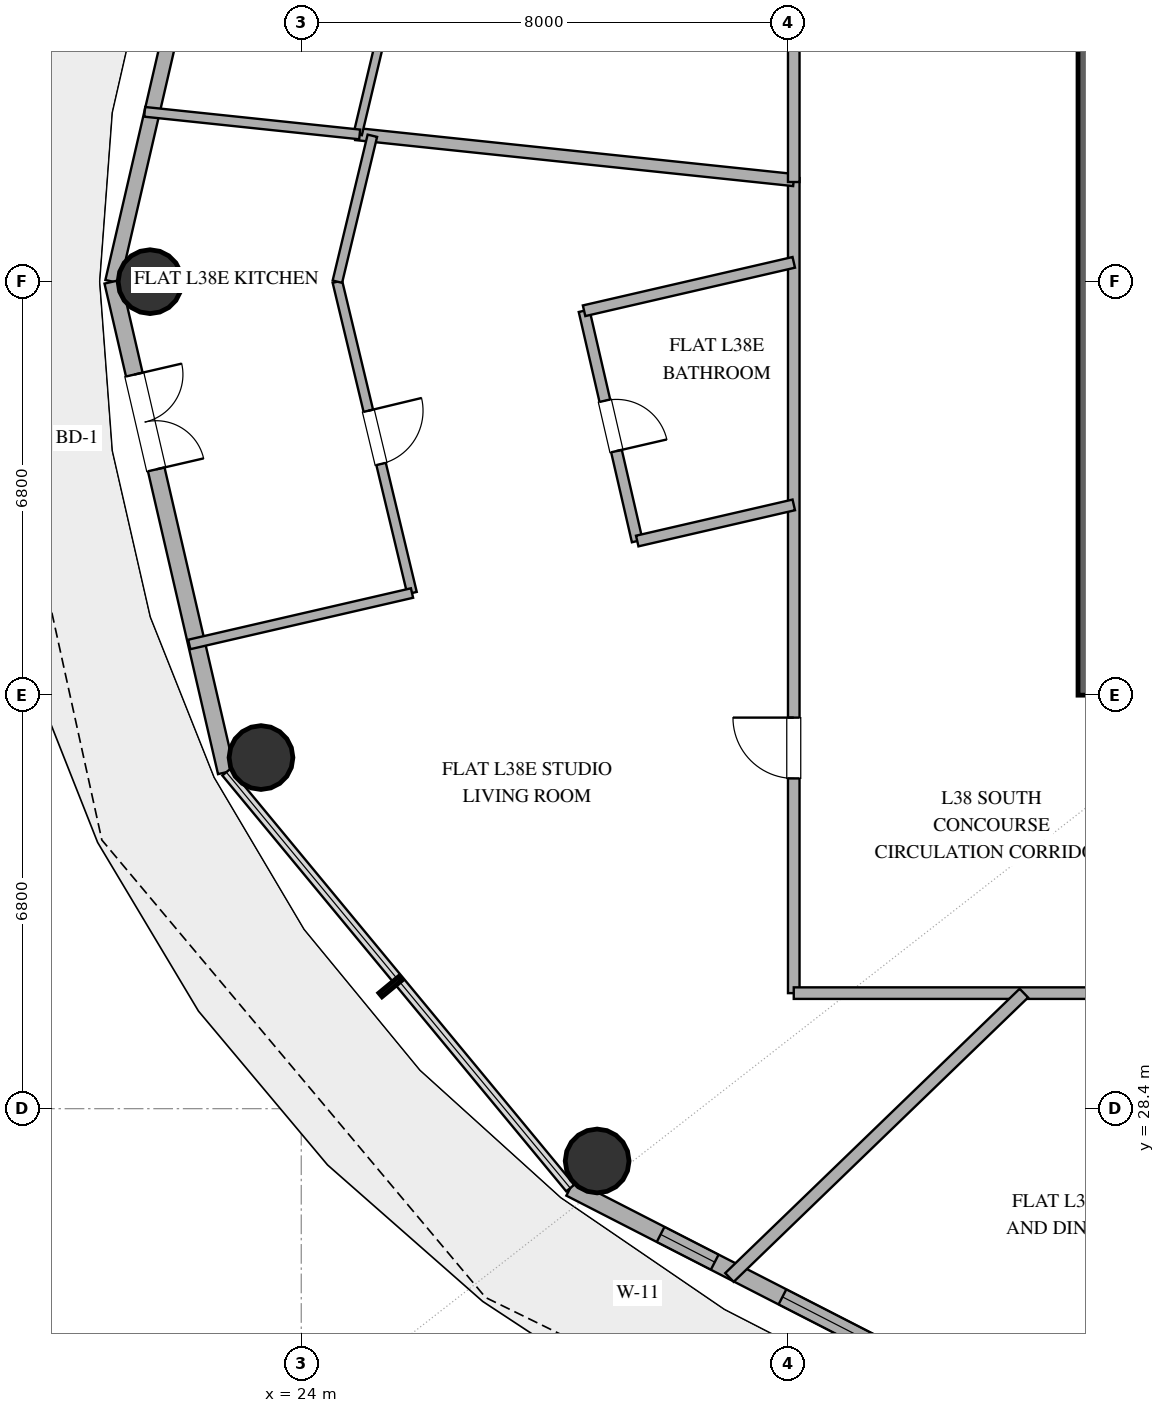
"""IFC4 building model, lengths in metres.
Left out: names, types, materials, properties, quantities, classifications, styles, units other than length and angle.
Written with IfcOpenShell. Run it as: python <this file> out.ifc"""

import sys

from ifc_helpers import new_model, si_unit, direction, frame, frame_2d, origin, origin_2d, place, context, subcontext, project, spatial, rectangle, hollow_circle, extrude, element, fill, save


model = new_model("IFC4")
c1 = context("Model", 3, precision=1e-05, world=origin(), true_north=direction((0.0, 1.0)))
c2 = subcontext(c1, "Body", "Model", "MODEL_VIEW")
j1 = project(units=[si_unit("LENGTHUNIT", "METRE"), si_unit("PLANEANGLEUNIT", "RADIAN")], contexts=[c1])
p1 = place(None, origin())
s1 = spatial("IfcSite", under=j1, at=p1, CompositionType="ELEMENT")
p2 = place(p1, origin())
s2 = spatial("IfcBuilding", under=s1, at=p2, CompositionType="ELEMENT")
p3 = place(p2, frame((0.0, 0.0, 154.2)))
s3 = spatial("IfcBuildingStorey", under=s2, at=p3, CompositionType="ELEMENT", Elevation=154.2)
p4 = place(p3, frame((37.0, 35.2, 0.0), z_axis=(0.0, 0.0, 1.0), x_axis=(0.0, 1.0, 0.0)))
e1 = element("IfcWall", 1, at=p4, inside=s3, PredefinedType="SHEAR", context=c2, shape_type="SweptSolid", body=[
    extrude(rectangle(XDim=13.6, YDim=0.45, at=frame_2d((6.8, 0.0))), origin(), (0.0, 0.0, 1.0), 3.38),
])
for number, where, z_axis, x_axis in (
    (2, (21.513, 42.0, 0.0), (0.0, 0.0, 1.0), (1.0, 0.0, 0.0)),
    (3, (23.338, 34.174, 0.0), (0.0, 0.0, 1.0), (1.0, 0.0, 0.0)),
    (4, (28.866, 27.54, 0.0), (0.0, 0.0, 1.0), (1.0, 0.0, 0.0)),
):
    element("IfcColumn", number, at=place(p3, frame(where, z_axis=z_axis, x_axis=x_axis)), inside=s3, PredefinedType="COLUMN", context=c2, shape_type="SweptSolid", body=[
        extrude(hollow_circle(Radius=0.525, WallThickness=0.028, at=origin_2d()), origin(), (0.0, 0.0, 1.0), 3.38),
    ])
p5 = place(p3, frame((22.768, 50.067, 0.0), z_axis=(0.0, 0.0, 1.0), x_axis=(-0.225473184558, -0.974249374157, 0.0)))
e5 = element("IfcWall", 5, at=p5, inside=s3, PredefinedType="SOLIDWALL", context=c2, shape_type="SweptSolid", body=[
    extrude(rectangle(XDim=8.28, YDim=0.25, at=frame_2d((4.14, 0.0))), origin(), (0.0, 0.0, 1.0), 3.38),
])
p6 = place(p5, frame((1.764, 0.0, 1.42)))
e6 = element("IfcOpeningElement", 6, at=p6, cuts=e5, PredefinedType="OPENING", context=c2, shape_type="SweptSolid", body=[
    extrude(rectangle(XDim=1.0, YDim=1.05, at=frame_2d((0.5, 0.525))), frame((0.0, 0.135, 0.0), z_axis=(0.0, -1.0, 0.0), x_axis=(1.0, 0.0, 0.0)), (0.0, 0.0, 1.0), 0.27),
])
p7 = place(p3, frame((20.901, 42.0, 0.0), z_axis=(0.0, 0.0, 1.0), x_axis=(0.225473184558, -0.974249374157, 0.0)))
e7 = element("IfcWall", 7, at=p7, inside=s3, PredefinedType="SOLIDWALL", context=c2, shape_type="SweptSolid", body=[
    extrude(rectangle(XDim=8.28, YDim=0.28, at=frame_2d((4.14, 0.0))), origin(), (0.0, 0.0, 1.0), 3.38),
])
p8 = place(p7, frame((1.568, 0.0, 0.0)))
e8 = element("IfcOpeningElement", 8, at=p8, cuts=e7, PredefinedType="OPENING", context=c2, shape_type="SweptSolid", body=[
    extrude(rectangle(XDim=1.6, YDim=2.25, at=frame_2d((0.8, 1.125))), frame((0.0, 0.15, 0.0), z_axis=(0.0, -1.0, 0.0), x_axis=(1.0, 0.0, 0.0)), (0.0, 0.0, 1.0), 0.3),
])
p9 = place(p3, frame((28.424, 27.094, 0.0), z_axis=(0.0, 0.0, 1.0), x_axis=(0.889872523182, -0.456209263919, 0.0)))
e9 = element("IfcWall", 9, at=p9, inside=s3, PredefinedType="SOLIDWALL", context=c2, shape_type="SweptSolid", body=[
    extrude(rectangle(XDim=10.016, YDim=0.28, at=frame_2d((5.008, 0.0))), origin(), (0.0, 0.0, 1.0), 3.38),
])
p10 = place(p9, frame((1.67, 0.0, 0.85)))
e10 = element("IfcOpeningElement", 10, at=p10, cuts=e9, PredefinedType="OPENING", context=c2, shape_type="SweptSolid", body=[
    extrude(rectangle(XDim=1.0, YDim=1.8, at=frame_2d((0.5, 0.9))), frame((0.0, 0.15, 0.0), z_axis=(0.0, -1.0, 0.0), x_axis=(1.0, 0.0, 0.0)), (0.0, 0.0, 1.0), 0.3),
])
p11 = place(p9, frame((3.922, 0.0, 0.85)))
e11 = element("IfcOpeningElement", 11, at=p11, cuts=e9, PredefinedType="OPENING", context=c2, shape_type="SweptSolid", body=[
    extrude(rectangle(XDim=1.65, YDim=2.0, at=frame_2d((0.825, 1.0))), frame((0.0, 0.15, 0.0), z_axis=(0.0, -1.0, 0.0), x_axis=(1.0, 0.0, 0.0)), (0.0, 0.0, 1.0), 0.3),
])
p12 = place(p9, frame((6.244, 0.0, 0.85)))
e12 = element("IfcOpeningElement", 12, at=p12, cuts=e9, PredefinedType="OPENING", context=c2, shape_type="SweptSolid", body=[
    extrude(rectangle(XDim=1.65, YDim=2.0, at=frame_2d((0.825, 1.0))), frame((0.0, 0.15, 0.0), z_axis=(0.0, -1.0, 0.0), x_axis=(1.0, 0.0, 0.0)), (0.0, 0.0, 1.0), 0.3),
])
p13 = place(p3, frame((32.1, 30.3, 0.0), z_axis=(0.0, 0.0, 1.0), x_axis=(0.0, 1.0, 0.0)))
e13 = element("IfcWall", 13, at=p13, inside=s3, PredefinedType="PARTITIONING", context=c2, shape_type="SweptSolid", body=[
    extrude(rectangle(XDim=13.403, YDim=0.19, at=frame_2d((6.702, 0.0))), origin(), (0.0, 0.0, 1.0), 2.74),
])
p14 = place(p13, frame((3.531, 0.0, 0.0)))
e14 = element("IfcOpeningElement", 14, at=p14, cuts=e13, PredefinedType="OPENING", context=c2, shape_type="SweptSolid", body=[
    extrude(rectangle(XDim=1.0, YDim=2.2, at=frame_2d((0.5, 1.1))), frame((0.0, 0.105, 0.0), z_axis=(0.0, -1.0, 0.0), x_axis=(1.0, 0.0, 0.0)), (0.0, 0.0, 1.0), 0.21),
])
p15 = place(p3, frame((32.1, 43.671, 0.0), z_axis=(0.0, 0.0, 1.0), x_axis=(-0.994522615629, 0.104521610217, 0.0)))
e15 = element("IfcWall", 15, at=p15, inside=s3, PredefinedType="PARTITIONING", context=c2, shape_type="SweptSolid", body=[
    extrude(rectangle(XDim=7.243, YDim=0.2, at=frame_2d((3.622, 0.0))), origin(), (0.0, 0.0, 1.0), 2.74),
])
p16 = place(p3, frame((32.1, 30.3, 0.0), z_axis=(0.0, 0.0, 1.0), x_axis=(1.0, 0.0, 0.0)))
e16 = element("IfcWall", 16, at=p16, inside=s3, PredefinedType="PARTITIONING", context=c2, shape_type="SweptSolid", body=[
    extrude(rectangle(XDim=15.491, YDim=0.19, at=frame_2d((7.746, 0.0))), origin(), (0.0, 0.0, 1.0), 2.74),
])
p17 = place(p16, frame((6.738, 0.0, 0.0)))
e17 = element("IfcOpeningElement", 17, at=p17, cuts=e16, PredefinedType="OPENING", context=c2, shape_type="SweptSolid", body=[
    extrude(rectangle(XDim=1.0, YDim=2.2, at=frame_2d((0.5, 1.1))), frame((0.0, 0.105, 0.0), z_axis=(0.0, -1.0, 0.0), x_axis=(1.0, 0.0, 0.0)), (0.0, 0.0, 1.0), 0.21),
])
p18 = place(p3, frame((31.042, 25.624, 0.0), z_axis=(0.0, 0.0, 1.0), x_axis=(0.719330837604, 0.694667651522, 0.0)))
e18 = element("IfcWall", 18, at=p18, inside=s3, PredefinedType="PARTITIONING", context=c2, shape_type="SweptSolid", body=[
    extrude(rectangle(XDim=6.731, YDim=0.2, at=frame_2d((3.366, 0.0))), origin(), (0.0, 0.0, 1.0), 2.74),
])
p19 = place(p3, frame((32.1, 43.639, 0.0), z_axis=(0.0, 0.0, 1.0), x_axis=(0.0, 1.0, 0.0)))
e19 = element("IfcWall", 19, at=p19, inside=s3, PredefinedType="PARTITIONING", context=c2, shape_type="SweptSolid", body=[
    extrude(rectangle(XDim=10.061, YDim=0.19, at=frame_2d((5.031, 0.0))), origin(), (0.0, 0.0, 1.0), 2.74),
])
p20 = place(p3, frame((24.594, 42.0, 0.0), z_axis=(0.0, 0.0, 1.0), x_axis=(0.233087094169, -0.972455863539, 0.0)))
e20 = element("IfcWall", 20, at=p20, inside=s3, PredefinedType="PLUMBINGWALL", context=c2, shape_type="SweptSolid", body=[
    extrude(rectangle(XDim=5.265, YDim=0.16, at=frame_2d((2.633, 0.0))), origin(), (0.0, 0.0, 1.0), 2.74),
])
p21 = place(p20, frame((2.183, 0.0, 0.0)))
e21 = element("IfcOpeningElement", 21, at=p21, cuts=e20, PredefinedType="OPENING", context=c2, shape_type="SweptSolid", body=[
    extrude(rectangle(XDim=0.9, YDim=2.1, at=frame_2d((0.45, 1.05))), frame((0.0, 0.09, 0.0), z_axis=(0.0, -1.0, 0.0), x_axis=(1.0, 0.0, 0.0)), (0.0, 0.0, 1.0), 0.18),
])
p22 = place(p3, frame((24.929, 44.425, 0.0), z_axis=(0.0, 0.0, 1.0), x_axis=(0.23166656053, 0.972795253243, 0.0)))
e22 = element("IfcWall", 22, at=p22, inside=s3, PredefinedType="PARTITIONING", context=c2, shape_type="SweptSolid", body=[
    extrude(rectangle(XDim=4.541, YDim=0.14, at=frame_2d((2.271, 0.0))), origin(), (0.0, 0.0, 1.0), 2.74),
])
p23 = place(p22, frame((1.821, 0.0, 0.0)))
e23 = element("IfcOpeningElement", 23, at=p23, cuts=e22, PredefinedType="OPENING", context=c2, shape_type="SweptSolid", body=[
    extrude(rectangle(XDim=0.9, YDim=2.1, at=frame_2d((0.45, 1.05))), frame((0.0, 0.08, 0.0), z_axis=(0.0, -1.0, 0.0), x_axis=(1.0, 0.0, 0.0)), (0.0, 0.0, 1.0), 0.16),
])
p24 = place(p3, frame((28.652, 41.522, 0.0), z_axis=(0.0, 0.0, 1.0), x_axis=(0.224891621851, -0.974383783948, 0.0)))
e24 = element("IfcWall", 24, at=p24, inside=s3, PredefinedType="PLUMBINGWALL", context=c2, shape_type="SweptSolid", body=[
    extrude(rectangle(XDim=3.886, YDim=0.18, at=frame_2d((1.943, 0.0))), origin(), (0.0, 0.0, 1.0), 2.74),
])
p25 = place(p24, frame((1.518, 0.0, 0.0)))
e25 = element("IfcOpeningElement", 25, at=p25, cuts=e24, PredefinedType="OPENING", context=c2, shape_type="SweptSolid", body=[
    extrude(rectangle(XDim=0.85, YDim=2.1, at=frame_2d((0.425, 1.05))), frame((0.0, 0.1, 0.0), z_axis=(0.0, -1.0, 0.0), x_axis=(1.0, 0.0, 0.0)), (0.0, 0.0, 1.0), 0.2),
])
p26 = place(p3, frame((25.822, 36.88, 0.0), z_axis=(0.0, 0.0, 1.0), x_axis=(-0.97437258695, -0.22494012937, 0.0)))
e26 = element("IfcWall", 26, at=p26, inside=s3, PredefinedType="PLUMBINGWALL", context=c2, shape_type="SweptSolid", body=[
    extrude(rectangle(XDim=3.76, YDim=0.16, at=frame_2d((1.88, 0.0))), origin(), (0.0, 0.0, 1.0), 2.74),
])
p27 = place(p3, frame((21.425, 44.793, 0.0), z_axis=(0.0, 0.0, 1.0), x_axis=(0.994516359121, -0.104581123727, 0.0)))
e27 = element("IfcWall", 27, at=p27, inside=s3, PredefinedType="PLUMBINGWALL", context=c2, shape_type="SweptSolid", body=[
    extrude(rectangle(XDim=3.555, YDim=0.16, at=frame_2d((1.778, 0.0))), origin(), (0.0, 0.0, 1.0), 2.74),
])
p28 = place(p3, frame((32.1, 42.318, 0.0), z_axis=(0.0, 0.0, 1.0), x_axis=(-0.974370264362, -0.224950189882, 0.0)))
e28 = element("IfcWall", 28, at=p28, inside=s3, PredefinedType="PLUMBINGWALL", context=c2, shape_type="SweptSolid", body=[
    extrude(rectangle(XDim=3.539, YDim=0.18, at=frame_2d((1.77, 0.0))), origin(), (0.0, 0.0, 1.0), 2.74),
])
p29 = place(p3, frame((29.526, 37.735, 0.0), z_axis=(0.0, 0.0, 1.0), x_axis=(0.974380293177, 0.224906745718, 0.0)))
e29 = element("IfcWall", 29, at=p29, inside=s3, PredefinedType="PLUMBINGWALL", context=c2, shape_type="SweptSolid", body=[
    extrude(rectangle(XDim=2.642, YDim=0.18, at=frame_2d((1.321, 0.0))), origin(), (0.0, 0.0, 1.0), 2.74),
])
p30 = place(p3, frame((25.169, 44.4, 0.0), z_axis=(0.0, 0.0, 1.0), x_axis=(-0.233096038601, -0.972453719613, 0.0)))
e30 = element("IfcWall", 30, at=p30, inside=s3, PredefinedType="PLUMBINGWALL", context=c2, shape_type="SweptSolid", body=[
    extrude(rectangle(XDim=2.468, YDim=0.16, at=frame_2d((1.234, 0.0))), origin(), (0.0, 0.0, 1.0), 2.74),
])
p31 = place(p8, origin())
e31 = element("IfcDoor", 31, at=p31, inside=s3, OperationType="DOUBLE_DOOR_SINGLE_SWING", PredefinedType="DOOR", context=c2, shape_type="SweptSolid", body=[
    extrude(rectangle(XDim=1.6, YDim=2.25, at=frame_2d((0.8, 1.125))), frame((0.0, 0.025, 0.0), z_axis=(0.0, -1.0, 0.0), x_axis=(1.0, 0.0, 0.0)), (0.0, 0.0, 1.0), 0.05),
])
fill(e8, e31)
p32 = place(p10, origin())
e32 = element("IfcWindow", 32, at=p32, inside=s3, PartitioningType="SINGLE_PANEL", PredefinedType="WINDOW", context=c2, shape_type="SweptSolid", body=[
    extrude(rectangle(XDim=1.0, YDim=1.8, at=frame_2d((0.5, 0.9))), frame((0.0, 0.03, 0.0), z_axis=(0.0, -1.0, 0.0), x_axis=(1.0, 0.0, 0.0)), (0.0, 0.0, 1.0), 0.06),
])
fill(e10, e32)
p33 = place(p11, origin())
e33 = element("IfcWindow", 33, at=p33, inside=s3, PartitioningType="SINGLE_PANEL", PredefinedType="WINDOW", context=c2, shape_type="SweptSolid", body=[
    extrude(rectangle(XDim=1.65, YDim=2.0, at=frame_2d((0.825, 1.0))), frame((0.0, 0.03, 0.0), z_axis=(0.0, -1.0, 0.0), x_axis=(1.0, 0.0, 0.0)), (0.0, 0.0, 1.0), 0.06),
])
fill(e11, e33)
p34 = place(p14, origin())
e34 = element("IfcDoor", 34, at=p34, inside=s3, OperationType="SINGLE_SWING_RIGHT", PredefinedType="DOOR", context=c2, shape_type="SweptSolid", body=[
    extrude(rectangle(XDim=1.0, YDim=2.2, at=frame_2d((0.5, 1.1))), frame((0.0, 0.025, 0.0), z_axis=(0.0, -1.0, 0.0), x_axis=(1.0, 0.0, 0.0)), (0.0, 0.0, 1.0), 0.05),
])
fill(e14, e34)
p35 = place(p21, origin())
e35 = element("IfcDoor", 35, at=p35, inside=s3, OperationType="SINGLE_SWING_LEFT", PredefinedType="DOOR", context=c2, shape_type="SweptSolid", body=[
    extrude(rectangle(XDim=0.9, YDim=2.1, at=frame_2d((0.45, 1.05))), frame((0.0, 0.025, 0.0), z_axis=(0.0, -1.0, 0.0), x_axis=(1.0, 0.0, 0.0)), (0.0, 0.0, 1.0), 0.05),
])
fill(e21, e35)
p36 = place(p25, origin())
e36 = element("IfcDoor", 36, at=p36, inside=s3, OperationType="SINGLE_SWING_RIGHT", PredefinedType="DOOR", context=c2, shape_type="SweptSolid", body=[
    extrude(rectangle(XDim=0.85, YDim=2.1, at=frame_2d((0.425, 1.05))), frame((0.0, 0.025, 0.0), z_axis=(0.0, -1.0, 0.0), x_axis=(1.0, 0.0, 0.0)), (0.0, 0.0, 1.0), 0.05),
])
fill(e25, e36)
save(model, sys.argv[1])
